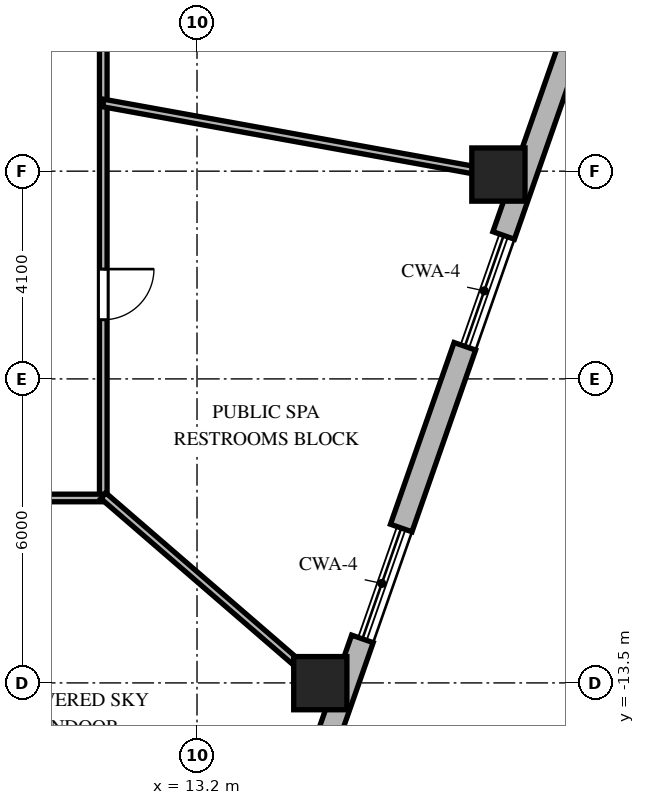
"""IFC4 building model, lengths in metres.
Left out: names, types, materials, properties, quantities, classifications, styles, units other than length and angle.
Written with IfcOpenShell. Run it as: python <this file> out.ifc"""

import sys

from ifc_helpers import new_model, si_unit, direction, frame, frame_2d, origin, origin_2d, place, context, subcontext, project, spatial, rectangle, extrude, element, fill, save


model = new_model("IFC4")
c1 = context("Model", 3, precision=1e-05, world=origin(), true_north=direction((0.0, 1.0)))
c2 = subcontext(c1, "Body", "Model", "MODEL_VIEW")
j1 = project(units=[si_unit("LENGTHUNIT", "METRE"), si_unit("PLANEANGLEUNIT", "RADIAN")], contexts=[c1])
p1 = place(None, origin())
s1 = spatial("IfcSite", under=j1, at=p1, CompositionType="ELEMENT")
p2 = place(p1, origin())
s2 = spatial("IfcBuilding", under=s1, at=p2, CompositionType="ELEMENT")
p3 = place(p2, frame((0.0, 0.0, 201.5)))
s3 = spatial("IfcBuildingStorey", under=s2, at=p3, CompositionType="ELEMENT", Elevation=201.5)
for number, where, z_axis, x_axis in (
    (1, (15.633, -13.505, 0.0), (0.0, 0.0, 1.0), (1.0, 0.0, 0.0)),
    (2, (19.148, -3.467, 0.0), (0.0, 0.0, 1.0), (1.0, 0.0, 0.0)),
):
    element("IfcColumn", number, at=place(p3, frame(where, z_axis=z_axis, x_axis=x_axis)), inside=s3, PredefinedType="COLUMN", context=c2, shape_type="SweptSolid", body=[
        extrude(rectangle(XDim=1.05, YDim=1.05, at=origin_2d()), origin(), (0.0, 0.0, 1.0), 5.0),
    ])
p4 = place(p3, frame((14.937, -16.993, 0.0), z_axis=(0.0, 0.0, 1.0), x_axis=(0.330437475159, 0.943827884209, 0.0)))
e3 = element("IfcWall", 3, at=p4, inside=s3, PredefinedType="SOLIDWALL", context=c2, shape_type="SweptSolid", body=[
    extrude(rectangle(XDim=4.622, YDim=0.45, at=frame_2d((2.311, 0.0))), origin(), (0.0, 0.0, 1.0), 4.7),
])
p5 = place(p3, frame((17.23, -10.443, 0.0), z_axis=(0.0, 0.0, 1.0), x_axis=(0.330436280441, 0.943828302483, 0.0)))
e4 = element("IfcWall", 4, at=p5, inside=s3, PredefinedType="SOLIDWALL", context=c2, shape_type="SweptSolid", body=[
    extrude(rectangle(XDim=3.8, YDim=0.45, at=frame_2d((1.9, 0.0))), origin(), (0.0, 0.0, 1.0), 4.7),
])
p6 = place(p3, frame((19.252, -4.669, 0.0), z_axis=(0.0, 0.0, 1.0), x_axis=(0.330411483424, 0.943836983606, 0.0)))
e5 = element("IfcWall", 5, at=p6, inside=s3, PredefinedType="SOLIDWALL", context=c2, shape_type="SweptSolid", body=[
    extrude(rectangle(XDim=4.631, YDim=0.45, at=frame_2d((2.315, 0.0))), origin(), (0.0, 0.0, 1.0), 4.7),
])
p7 = place(p3, frame((11.35, 9.85, 0.0), z_axis=(0.0, 0.0, 1.0), x_axis=(0.0, -1.0, 0.0)))
e6 = element("IfcWall", 6, at=p7, inside=s3, PredefinedType="PARTITIONING", context=c2, shape_type="SweptSolid", body=[
    extrude(rectangle(XDim=19.7, YDim=0.15, at=frame_2d((9.85, 0.0))), origin(), (0.0, 0.0, 1.0), 2.89),
])
p8 = place(p7, frame((2.989, 0.0, 0.0)))
e7 = element("IfcOpeningElement", 7, at=p8, cuts=e6, PredefinedType="OPENING", context=c2, shape_type="SweptSolid", body=[
    extrude(rectangle(XDim=1.0, YDim=2.03, at=frame_2d((0.5, 1.015))), frame((0.0, 0.085, 0.0), z_axis=(0.0, -1.0, 0.0), x_axis=(1.0, 0.0, 0.0)), (0.0, 0.0, 1.0), 0.17),
])
p9 = place(p7, frame((15.183, 0.0, 0.0)))
e8 = element("IfcOpeningElement", 8, at=p9, cuts=e6, PredefinedType="OPENING", context=c2, shape_type="SweptSolid", body=[
    extrude(rectangle(XDim=1.0, YDim=2.03, at=frame_2d((0.5, 1.015))), frame((0.0, 0.085, 0.0), z_axis=(0.0, -1.0, 0.0), x_axis=(1.0, 0.0, 0.0)), (0.0, 0.0, 1.0), 0.17),
])
p10 = place(p7, frame((8.819, 0.0, 0.0)))
e9 = element("IfcOpeningElement", 9, at=p10, cuts=e6, PredefinedType="OPENING", context=c2, shape_type="SweptSolid", body=[
    extrude(rectangle(XDim=1.0, YDim=2.03, at=frame_2d((0.5, 1.015))), frame((0.0, 0.085, 0.0), z_axis=(0.0, -1.0, 0.0), x_axis=(1.0, 0.0, 0.0)), (0.0, 0.0, 1.0), 0.17),
])
p11 = place(p3, frame((11.35, -9.85, 0.0), z_axis=(0.0, 0.0, 1.0), x_axis=(-1.0, 0.0, 0.0)))
e10 = element("IfcWall", 10, at=p11, inside=s3, PredefinedType="PARTITIONING", context=c2, shape_type="SweptSolid", body=[
    extrude(rectangle(XDim=22.7, YDim=0.15, at=frame_2d((11.35, 0.0))), origin(), (0.0, 0.0, 1.0), 2.89),
])
p12 = place(p11, frame((17.347, 0.0, 0.0)))
e11 = element("IfcOpeningElement", 11, at=p12, cuts=e10, PredefinedType="OPENING", context=c2, shape_type="SweptSolid", body=[
    extrude(rectangle(XDim=1.0, YDim=2.03, at=frame_2d((0.5, 1.015))), frame((0.0, 0.085, 0.0), z_axis=(0.0, -1.0, 0.0), x_axis=(1.0, 0.0, 0.0)), (0.0, 0.0, 1.0), 0.17),
])
p13 = place(p11, frame((10.423, 0.0, 0.0)))
e12 = element("IfcOpeningElement", 12, at=p13, cuts=e10, PredefinedType="OPENING", context=c2, shape_type="SweptSolid", body=[
    extrude(rectangle(XDim=1.0, YDim=2.03, at=frame_2d((0.5, 1.015))), frame((0.0, 0.085, 0.0), z_axis=(0.0, -1.0, 0.0), x_axis=(1.0, 0.0, 0.0)), (0.0, 0.0, 1.0), 0.17),
])
p14 = place(p11, frame((3.362, 0.0, 0.0)))
e13 = element("IfcOpeningElement", 13, at=p14, cuts=e10, PredefinedType="OPENING", context=c2, shape_type="SweptSolid", body=[
    extrude(rectangle(XDim=1.0, YDim=2.03, at=frame_2d((0.5, 1.015))), frame((0.0, 0.085, 0.0), z_axis=(0.0, -1.0, 0.0), x_axis=(1.0, 0.0, 0.0)), (0.0, 0.0, 1.0), 0.17),
])
p15 = place(p3, frame((11.35, -9.805, 0.0), z_axis=(0.0, 0.0, 1.0), x_axis=(0.75671839422, -0.653740982232, 0.0)))
e14 = element("IfcWall", 14, at=p15, inside=s3, PredefinedType="PARTITIONING", context=c2, shape_type="SweptSolid", body=[
    extrude(rectangle(XDim=6.193, YDim=0.15, at=frame_2d((3.096, 0.0))), origin(), (0.0, 0.0, 1.0), 2.89),
])
p16 = place(p3, frame((11.35, -2.055, 0.0), z_axis=(0.0, 0.0, 1.0), x_axis=(0.983999921986, -0.178168890468, 0.0)))
e15 = element("IfcWall", 15, at=p16, inside=s3, PredefinedType="PARTITIONING", context=c2, shape_type="SweptSolid", body=[
    extrude(rectangle(XDim=8.426, YDim=0.15, at=frame_2d((4.213, 0.0))), origin(), (0.0, 0.0, 1.0), 2.89),
])
p17 = place(p9, origin())
e16 = element("IfcDoor", 16, at=p17, inside=s3, OperationType="SINGLE_SWING_LEFT", PredefinedType="DOOR", context=c2, shape_type="SweptSolid", body=[
    extrude(rectangle(XDim=1.0, YDim=2.03, at=frame_2d((0.5, 1.015))), frame((0.0, 0.025, 0.0), z_axis=(0.0, -1.0, 0.0), x_axis=(1.0, 0.0, 0.0)), (0.0, 0.0, 1.0), 0.05),
])
fill(e8, e16)
save(model, sys.argv[1])
